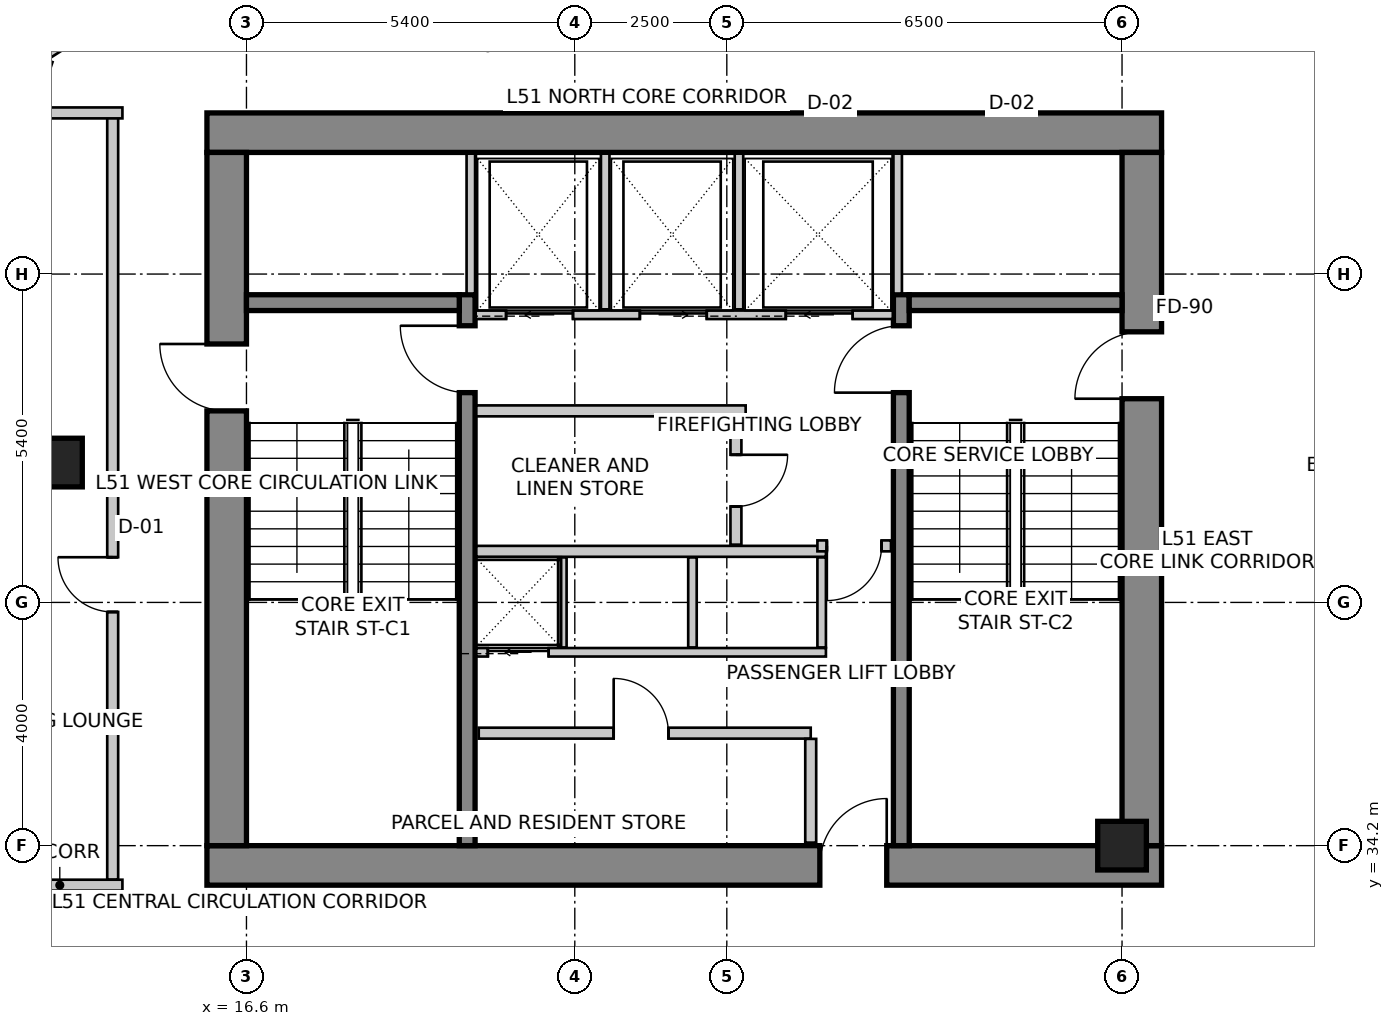
"""IFC4 building model, lengths in metres.
Left out: names, types, materials, properties, quantities, classifications, styles, units other than length and angle.
Written with IfcOpenShell. Run it as: python <this file> out.ifc"""

import sys

from ifc_helpers import new_model, si_unit, direction, frame, frame_2d, origin, origin_2d, place, context, subcontext, project, spatial, rectangle, extrude, source, transform, mapped, element, fill, save


model = new_model("IFC4")
c1 = context("Model", 3, precision=1e-05, world=origin(), true_north=direction((0.0, 1.0)))
c2 = subcontext(c1, "Body", "Model", "MODEL_VIEW")
j1 = project(units=[si_unit("LENGTHUNIT", "METRE"), si_unit("PLANEANGLEUNIT", "RADIAN")], contexts=[c1])
p1 = place(None, origin())
s1 = spatial("IfcSite", under=j1, at=p1, CompositionType="ELEMENT")
p2 = place(p1, origin())
s2 = spatial("IfcBuilding", under=s1, at=p2, CompositionType="ELEMENT")
p3 = place(p2, frame((0.0, 0.0, 204.4)))
s3 = spatial("IfcBuildingStorey", under=s2, at=p3, CompositionType="ELEMENT", Elevation=204.4)
p4 = place(p3, frame((15.95, 45.925, 0.0), z_axis=(0.0, 0.0, 1.0), x_axis=(1.0, 0.0, 0.0)))
e1 = element("IfcWall", 1, at=p4, inside=s3, PredefinedType="SHEAR", context=c2, shape_type="SweptSolid", body=[
    extrude(rectangle(XDim=15.7, YDim=0.65, at=frame_2d((7.85, 0.0))), origin(), (0.0, 0.0, 1.0), 3.5),
])
p5 = place(p3, frame((15.95, 33.875, 0.0), z_axis=(0.0, 0.0, 1.0), x_axis=(1.0, 0.0, 0.0)))
e2 = element("IfcWall", 2, at=p5, inside=s3, PredefinedType="SHEAR", context=c2, shape_type="SweptSolid", body=[
    extrude(rectangle(XDim=15.7, YDim=0.65, at=frame_2d((7.85, 0.0))), origin(), (0.0, 0.0, 1.0), 3.5),
])
m1 = source(origin(), c2, "Body", "SweptSolid", [
    extrude(rectangle(XDim=1.1, YDim=2.15, at=frame_2d((0.55, 1.075))), frame((0.0, 0.335, 0.0), z_axis=(0.0, -1.0, 0.0), x_axis=(1.0, 0.0, 0.0)), (0.0, 0.0, 1.0), 0.67),
])
p6 = place(p5, frame((10.08, 0.0, 0.0)))
e3 = element("IfcOpeningElement", 3, at=p6, cuts=e2, PredefinedType="OPENING", context=c2, shape_type="MappedRepresentation", body=[
    mapped(m1, transform((0.0, 0.0, 0.0), scale=1.0)),
])
p7 = place(p3, frame((16.275, 34.2, 0.0), z_axis=(0.0, 0.0, 1.0), x_axis=(0.0, 1.0, 0.0)))
e4 = element("IfcWall", 4, at=p7, inside=s3, PredefinedType="SHEAR", context=c2, shape_type="SweptSolid", body=[
    extrude(rectangle(XDim=11.4, YDim=0.65, at=frame_2d((5.7, 0.0))), origin(), (0.0, 0.0, 1.0), 3.5),
])
p8 = place(p7, frame((7.15, 0.0, 0.0)))
e5 = element("IfcOpeningElement", 5, at=p8, cuts=e4, PredefinedType="OPENING", context=c2, shape_type="MappedRepresentation", body=[
    mapped(m1, transform((0.0, 0.0, 0.0), scale=1.0)),
])
p9 = place(p3, frame((31.325, 34.2, 0.0), z_axis=(0.0, 0.0, 1.0), x_axis=(0.0, 1.0, 0.0)))
e6 = element("IfcWall", 6, at=p9, inside=s3, PredefinedType="SHEAR", context=c2, shape_type="SweptSolid", body=[
    extrude(rectangle(XDim=11.4, YDim=0.65, at=frame_2d((5.7, 0.0))), origin(), (0.0, 0.0, 1.0), 3.5),
])
p10 = place(p9, frame((7.35, 0.0, 0.0)))
e7 = element("IfcOpeningElement", 7, at=p10, cuts=e6, PredefinedType="OPENING", context=c2, shape_type="MappedRepresentation", body=[
    mapped(m1, transform((0.0, 0.0, 0.0), scale=1.0)),
])
p11 = place(p3, frame((20.23, 34.2, 0.0), z_axis=(0.0, 0.0, 1.0), x_axis=(0.0, 1.0, 0.0)))
e8 = element("IfcWall", 8, at=p11, inside=s3, PredefinedType="SHEAR", context=c2, shape_type="SweptSolid", body=[
    extrude(rectangle(XDim=9.06, YDim=0.26, at=frame_2d((4.53, 0.0))), origin(), (0.0, 0.0, 1.0), 3.5),
])
m2 = source(origin(), c2, "Body", "SweptSolid", [
    extrude(rectangle(XDim=1.1, YDim=2.15, at=frame_2d((0.55, 1.075))), frame((0.0, 0.14, 0.0), z_axis=(0.0, -1.0, 0.0), x_axis=(1.0, 0.0, 0.0)), (0.0, 0.0, 1.0), 0.28),
])
p12 = place(p11, frame((7.45, 0.0, 0.0)))
e9 = element("IfcOpeningElement", 9, at=p12, cuts=e8, PredefinedType="OPENING", context=c2, shape_type="MappedRepresentation", body=[
    mapped(m2, transform((0.0, 0.0, 0.0), scale=1.0)),
])
p13 = place(p3, frame((27.37, 34.2, 0.0), z_axis=(0.0, 0.0, 1.0), x_axis=(0.0, 1.0, 0.0)))
e10 = element("IfcWall", 10, at=p13, inside=s3, PredefinedType="SHEAR", context=c2, shape_type="SweptSolid", body=[
    extrude(rectangle(XDim=9.06, YDim=0.26, at=frame_2d((4.53, 0.0))), origin(), (0.0, 0.0, 1.0), 3.5),
])
p14 = place(p13, frame((7.45, 0.0, 0.0)))
e11 = element("IfcOpeningElement", 11, at=p14, cuts=e10, PredefinedType="OPENING", context=c2, shape_type="MappedRepresentation", body=[
    mapped(m2, transform((0.0, 0.0, 0.0), scale=1.0)),
])
for number, where, z_axis, x_axis in (
    (12, (16.6, 43.13, 0.0), (0.0, 0.0, 1.0), (1.0, 0.0, 0.0)),
    (13, (27.5, 43.13, 0.0), (0.0, 0.0, 1.0), (1.0, 0.0, 0.0)),
):
    element("IfcWall", number, at=place(p3, frame(where, z_axis=z_axis, x_axis=x_axis)), inside=s3, PredefinedType="SHEAR", context=c2, shape_type="SweptSolid", body=[
        extrude(rectangle(XDim=3.5, YDim=0.26, at=frame_2d((1.75, 0.0))), origin(), (0.0, 0.0, 1.0), 3.5),
    ])
m3 = source(origin(), c2, "Body", "SweptSolid", [
    extrude(rectangle(XDim=0.8, YDim=0.8, at=origin_2d()), origin(), (0.0, 0.0, 1.0), 3.5),
])
for number, where, z_axis, x_axis in (
    (14, (13.5, 40.5, 0.0), (0.0, 0.0, 1.0), (1.0, 0.0, 0.0)),
    (15, (31.0, 34.2, 0.0), (0.0, 0.0, 1.0), (1.0, 0.0, 0.0)),
):
    element("IfcColumn", number, at=place(p3, frame(where, z_axis=z_axis, x_axis=x_axis)), inside=s3, PredefinedType="COLUMN", context=c2, shape_type="MappedRepresentation", body=[
        mapped(m3, transform((0.0, 0.0, 0.0), scale=1.0)),
    ])
p15 = place(p3, frame((21.875, 52.742, 0.0), z_axis=(0.0, 0.0, 1.0), x_axis=(-0.843666375448, -0.536867811419, 0.0)))
e16 = element("IfcWall", 16, at=p15, inside=s3, PredefinedType="SOLIDWALL", context=c2, shape_type="SweptSolid", body=[
    extrude(rectangle(XDim=10.284, YDim=0.3, at=frame_2d((5.142, 0.0))), origin(), (0.0, 0.0, 1.0), 3.25),
])
m4 = source(origin(), c2, "Body", "SweptSolid", [
    extrude(rectangle(XDim=2.4, YDim=2.2, at=frame_2d((1.2, 1.1))), frame((0.0, 0.16, 0.0), z_axis=(0.0, -1.0, 0.0), x_axis=(1.0, 0.0, 0.0)), (0.0, 0.0, 1.0), 0.32),
])
p16 = place(p15, frame((3.307, 0.0, 0.85)))
e17 = element("IfcOpeningElement", 17, at=p16, cuts=e16, PredefinedType="OPENING", context=c2, shape_type="MappedRepresentation", body=[
    mapped(m4, transform((0.0, 0.0, 0.0), scale=1.0)),
])
p17 = place(p3, frame((13.269, 47.134, 0.0), z_axis=(0.0, 0.0, 1.0), x_axis=(-0.319920776449, -0.947444297464, 0.0)))
e18 = element("IfcWall", 18, at=p17, inside=s3, PredefinedType="SOLIDWALL", context=c2, shape_type="SweptSolid", body=[
    extrude(rectangle(XDim=16.133, YDim=0.3, at=frame_2d((8.067, 0.0))), origin(), (0.0, 0.0, 1.0), 3.25),
])
m5 = source(origin(), c2, "Body", "SweptSolid", [
    extrude(rectangle(XDim=2.1, YDim=2.0, at=frame_2d((1.05, 1.0))), frame((0.0, 0.16, 0.0), z_axis=(0.0, -1.0, 0.0), x_axis=(1.0, 0.0, 0.0)), (0.0, 0.0, 1.0), 0.32),
])
p18 = place(p17, frame((2.513, 0.0, 0.85)))
e19 = element("IfcOpeningElement", 19, at=p18, cuts=e18, PredefinedType="OPENING", context=c2, shape_type="MappedRepresentation", body=[
    mapped(m5, transform((0.0, 0.0, 0.0), scale=1.0)),
])
p19 = place(p17, frame((7.26, 0.0, 0.85)))
e20 = element("IfcOpeningElement", 20, at=p19, cuts=e18, PredefinedType="OPENING", context=c2, shape_type="MappedRepresentation", body=[
    mapped(m4, transform((0.0, 0.0, 0.0), scale=1.0)),
])
p20 = place(p17, frame((12.307, 0.0, 0.85)))
e21 = element("IfcOpeningElement", 21, at=p20, cuts=e18, PredefinedType="OPENING", context=c2, shape_type="MappedRepresentation", body=[
    mapped(m5, transform((0.0, 0.0, 0.0), scale=1.0)),
])
p21 = place(p3, frame((20.37, 42.93, 0.0), z_axis=(0.0, 0.0, 1.0), x_axis=(1.0, 0.0, 0.0)))
e22 = element("IfcWall", 22, at=p21, inside=s3, PredefinedType="SOLIDWALL", context=c2, shape_type="SweptSolid", body=[
    extrude(rectangle(XDim=6.86, YDim=0.14, at=frame_2d((3.43, 0.0))), origin(), (0.0, 0.0, 1.0), 3.25),
])
m6 = source(origin(), c2, "Body", "SweptSolid", [
    extrude(rectangle(XDim=1.1, YDim=2.15, at=frame_2d((0.55, 1.075))), frame((0.0, 0.08, 0.0), z_axis=(0.0, -1.0, 0.0), x_axis=(1.0, 0.0, 0.0)), (0.0, 0.0, 1.0), 0.16),
])
p22 = place(p21, frame((0.5, 0.0, 0.0)))
e23 = element("IfcOpeningElement", 23, at=p22, cuts=e22, PredefinedType="OPENING", context=c2, shape_type="MappedRepresentation", body=[
    mapped(m6, transform((0.0, 0.0, 0.0), scale=1.0)),
])
p23 = place(p21, frame((2.7, 0.0, 0.0)))
e24 = element("IfcOpeningElement", 24, at=p23, cuts=e22, PredefinedType="OPENING", context=c2, shape_type="MappedRepresentation", body=[
    mapped(m6, transform((0.0, 0.0, 0.0), scale=1.0)),
])
p24 = place(p21, frame((5.1, 0.0, 0.0)))
e25 = element("IfcOpeningElement", 25, at=p24, cuts=e22, PredefinedType="OPENING", context=c2, shape_type="MappedRepresentation", body=[
    mapped(m6, transform((0.0, 0.0, 0.0), scale=1.0)),
])
for number, where, z_axis, x_axis in (
    (26, (20.29, 43.28, 0.0), (0.0, 0.0, 1.0), (0.0, 1.0, 0.0)),
    (27, (27.31, 43.28, 0.0), (0.0, 0.0, 1.0), (0.0, 1.0, 0.0)),
):
    element("IfcWall", number, at=place(p3, frame(where, z_axis=z_axis, x_axis=x_axis)), inside=s3, PredefinedType="SOLIDWALL", context=c2, shape_type="SweptSolid", body=[
        extrude(rectangle(XDim=2.3, YDim=0.14, at=frame_2d((1.15, 0.0))), origin(), (0.0, 0.0, 1.0), 3.25),
    ])
for number, where, z_axis, x_axis in (
    (28, (22.5, 43.02, 0.0), (0.0, 0.0, 1.0), (0.0, 1.0, 0.0)),
    (29, (24.7, 43.02, 0.0), (0.0, 0.0, 1.0), (0.0, 1.0, 0.0)),
):
    element("IfcWall", number, at=place(p3, frame(where, z_axis=z_axis, x_axis=x_axis)), inside=s3, PredefinedType="SOLIDWALL", context=c2, shape_type="SweptSolid", body=[
        extrude(rectangle(XDim=2.56, YDim=0.14, at=frame_2d((1.28, 0.0))), origin(), (0.0, 0.0, 1.0), 3.25),
    ])
p25 = place(p3, frame((20.38, 37.38, 0.0), z_axis=(0.0, 0.0, 1.0), x_axis=(1.0, 0.0, 0.0)))
e30 = element("IfcWall", 30, at=p25, inside=s3, PredefinedType="SOLIDWALL", context=c2, shape_type="SweptSolid", body=[
    extrude(rectangle(XDim=5.75, YDim=0.14, at=frame_2d((2.875, 0.0))), origin(), (0.0, 0.0, 1.0), 3.25),
])
m7 = source(origin(), c2, "Body", "SweptSolid", [
    extrude(rectangle(XDim=1.0, YDim=2.15, at=frame_2d((0.5, 1.075))), frame((0.0, 0.08, 0.0), z_axis=(0.0, -1.0, 0.0), x_axis=(1.0, 0.0, 0.0)), (0.0, 0.0, 1.0), 0.16),
])
p26 = place(p25, frame((0.19, 0.0, 0.0)))
e31 = element("IfcOpeningElement", 31, at=p26, cuts=e30, PredefinedType="OPENING", context=c2, shape_type="MappedRepresentation", body=[
    mapped(m7, transform((0.0, 0.0, 0.0), scale=1.0)),
])
p27 = place(p3, frame((20.38, 39.04, 0.0), z_axis=(0.0, 0.0, 1.0), x_axis=(1.0, 0.0, 0.0)))
e32 = element("IfcWall", 32, at=p27, inside=s3, PredefinedType="SOLIDWALL", context=c2, shape_type="SweptSolid", body=[
    extrude(rectangle(XDim=5.75, YDim=0.18, at=frame_2d((2.875, 0.0))), origin(), (0.0, 0.0, 1.0), 3.25),
])
for number, where, z_axis, x_axis in (
    (33, (26.06, 37.46, 0.0), (0.0, 0.0, 1.0), (0.0, 1.0, 0.0)),
    (34, (21.795, 37.46, 0.0), (0.0, 0.0, 1.0), (0.0, 1.0, 0.0)),
    (35, (23.935, 37.46, 0.0), (0.0, 0.0, 1.0), (0.0, 1.0, 0.0)),
):
    element("IfcWall", number, at=place(p3, frame(where, z_axis=z_axis, x_axis=x_axis)), inside=s3, PredefinedType="SOLIDWALL", context=c2, shape_type="SweptSolid", body=[
        extrude(rectangle(XDim=1.48, YDim=0.14, at=frame_2d((0.74, 0.0))), origin(), (0.0, 0.0, 1.0), 3.25),
    ])
p28 = place(p3, frame((24.81, 41.35, 0.0), z_axis=(0.0, 0.0, 1.0), x_axis=(-1.0, 0.0, 0.0)))
e36 = element("IfcWall", 36, at=p28, inside=s3, PredefinedType="PARTITIONING", context=c2, shape_type="SweptSolid", body=[
    extrude(rectangle(XDim=4.43, YDim=0.18, at=frame_2d((2.215, 0.0))), origin(), (0.0, 0.0, 1.0), 3.25),
])
p29 = place(p3, frame((24.65, 41.256, 0.0), z_axis=(0.0, 0.0, 1.0), x_axis=(0.0, -1.0, 0.0)))
e37 = element("IfcWall", 37, at=p29, inside=s3, PredefinedType="PARTITIONING", context=c2, shape_type="SweptSolid", body=[
    extrude(rectangle(XDim=2.106, YDim=0.18, at=frame_2d((1.053, 0.0))), origin(), (0.0, 0.0, 1.0), 3.25),
])
m8 = source(origin(), c2, "Body", "SweptSolid", [
    extrude(rectangle(XDim=0.85, YDim=2.15, at=frame_2d((0.425, 1.075))), frame((0.0, 0.1, 0.0), z_axis=(0.0, -1.0, 0.0), x_axis=(1.0, 0.0, 0.0)), (0.0, 0.0, 1.0), 0.2),
])
p30 = place(p29, frame((0.628, 0.0, 0.0)))
e38 = element("IfcOpeningElement", 38, at=p30, cuts=e37, PredefinedType="OPENING", context=c2, shape_type="MappedRepresentation", body=[
    mapped(m8, transform((0.0, 0.0, 0.0), scale=1.0)),
])
p31 = place(p3, frame((27.2, 39.13, 0.0), z_axis=(0.0, 0.0, 1.0), x_axis=(-1.0, 0.0, 0.0)))
e39 = element("IfcWall", 39, at=p31, inside=s3, PredefinedType="PARTITIONING", context=c2, shape_type="SweptSolid", body=[
    extrude(rectangle(XDim=1.21, YDim=0.18, at=frame_2d((0.605, 0.0))), origin(), (0.0, 0.0, 1.0), 3.25),
])
m9 = source(origin(), c2, "Body", "SweptSolid", [
    extrude(rectangle(XDim=0.9, YDim=2.15, at=frame_2d((0.45, 1.075))), frame((0.0, 0.1, 0.0), z_axis=(0.0, -1.0, 0.0), x_axis=(1.0, 0.0, 0.0)), (0.0, 0.0, 1.0), 0.2),
])
p32 = place(p31, frame((0.155, 0.0, 0.0)))
e40 = element("IfcOpeningElement", 40, at=p32, cuts=e39, PredefinedType="OPENING", context=c2, shape_type="MappedRepresentation", body=[
    mapped(m9, transform((0.0, 0.0, 0.0), scale=1.0)),
])
p33 = place(p3, frame((20.42, 36.05, 0.0), z_axis=(0.0, 0.0, 1.0), x_axis=(1.0, 0.0, 0.0)))
e41 = element("IfcWall", 41, at=p33, inside=s3, PredefinedType="PARTITIONING", context=c2, shape_type="SweptSolid", body=[
    extrude(rectangle(XDim=5.46, YDim=0.18, at=frame_2d((2.73, 0.0))), origin(), (0.0, 0.0, 1.0), 3.25),
])
p34 = place(p33, frame((2.219, 0.0, 0.0)))
e42 = element("IfcOpeningElement", 42, at=p34, cuts=e41, PredefinedType="OPENING", context=c2, shape_type="MappedRepresentation", body=[
    mapped(m9, transform((0.0, 0.0, 0.0), scale=1.0)),
])
p35 = place(p3, frame((25.88, 35.956, 0.0), z_axis=(0.0, 0.0, 1.0), x_axis=(0.0, -1.0, 0.0)))
e43 = element("IfcWall", 43, at=p35, inside=s3, PredefinedType="PARTITIONING", context=c2, shape_type="SweptSolid", body=[
    extrude(rectangle(XDim=1.706, YDim=0.18, at=frame_2d((0.853, 0.0))), origin(), (0.0, 0.0, 1.0), 2.542),
])
p36 = place(p3, frame((12.5, 33.55, 0.0), z_axis=(0.0, 0.0, 1.0), x_axis=(1.0, 0.0, 0.0)))
e44 = element("IfcWall", 44, at=p36, inside=s3, PredefinedType="PARTITIONING", context=c2, shape_type="SweptSolid", body=[
    extrude(rectangle(XDim=2.06, YDim=0.18, at=frame_2d((1.03, 0.0))), origin(), (0.0, 0.0, 1.0), 3.25),
])
p37 = place(p3, frame((14.4, 33.644, 0.0), z_axis=(0.0, 0.0, 1.0), x_axis=(0.0, 1.0, 0.0)))
e45 = element("IfcWall", 45, at=p37, inside=s3, PredefinedType="PARTITIONING", context=c2, shape_type="SweptSolid", body=[
    extrude(rectangle(XDim=12.606, YDim=0.18, at=frame_2d((6.303, 0.0))), origin(), (0.0, 0.0, 1.0), 3.25),
])
p38 = place(p37, frame((4.399, 0.0, 0.0)))
e46 = element("IfcOpeningElement", 46, at=p38, cuts=e45, PredefinedType="OPENING", context=c2, shape_type="MappedRepresentation", body=[
    mapped(m9, transform((0.0, 0.0, 0.0), scale=1.0)),
])
p39 = place(p3, frame((14.56, 46.25, 0.0), z_axis=(0.0, 0.0, 1.0), x_axis=(-1.0, 0.0, 0.0)))
e47 = element("IfcWall", 47, at=p39, inside=s3, PredefinedType="PARTITIONING", context=c2, shape_type="SweptSolid", body=[
    extrude(rectangle(XDim=1.469, YDim=0.18, at=frame_2d((0.734, 0.0))), origin(), (0.0, 0.0, 1.0), 3.25),
])
m10 = source(origin(), c2, "Body", "SweptSolid", [
    extrude(rectangle(XDim=1.1, YDim=2.15, at=frame_2d((0.55, 1.075))), frame((0.0, 0.025, 0.0), z_axis=(0.0, -1.0, 0.0), x_axis=(1.0, 0.0, 0.0)), (0.0, 0.0, 1.0), 0.05),
])
p40 = place(p22, origin())
e48 = element("IfcDoor", 48, at=p40, inside=s3, OperationType="SLIDING_TO_LEFT", PredefinedType="DOOR", context=c2, shape_type="MappedRepresentation", body=[
    mapped(m10, transform((0.0, 0.0, 0.0), scale=1.0)),
])
fill(e23, e48)
p41 = place(p23, origin())
e49 = element("IfcDoor", 49, at=p41, inside=s3, OperationType="SLIDING_TO_RIGHT", PredefinedType="DOOR", context=c2, shape_type="MappedRepresentation", body=[
    mapped(m10, transform((0.0, 0.0, 0.0), scale=1.0)),
])
fill(e24, e49)
m11 = source(origin(), c2, "Body", "SweptSolid", [
    extrude(rectangle(XDim=1.1, YDim=2.15, at=frame_2d((0.55, 1.075))), frame((0.0, 0.025, 0.0), z_axis=(0.0, -1.0, 0.0), x_axis=(1.0, 0.0, 0.0)), (0.0, 0.0, 1.0), 0.05),
])
p42 = place(p24, origin())
e50 = element("IfcDoor", 50, at=p42, inside=s3, OperationType="SLIDING_TO_LEFT", PredefinedType="DOOR", context=c2, shape_type="MappedRepresentation", body=[
    mapped(m11, transform((0.0, 0.0, 0.0), scale=1.0)),
])
fill(e25, e50)
m12 = source(origin(), c2, "Body", "SweptSolid", [
    extrude(rectangle(XDim=1.0, YDim=2.15, at=frame_2d((0.5, 1.075))), frame((0.0, 0.025, 0.0), z_axis=(0.0, -1.0, 0.0), x_axis=(1.0, 0.0, 0.0)), (0.0, 0.0, 1.0), 0.05),
])
p43 = place(p26, origin())
e51 = element("IfcDoor", 51, at=p43, inside=s3, OperationType="SLIDING_TO_LEFT", PredefinedType="DOOR", context=c2, shape_type="MappedRepresentation", body=[
    mapped(m12, transform((0.0, 0.0, 0.0), scale=1.0)),
])
fill(e31, e51)
m13 = source(origin(), c2, "Body", "SweptSolid", [
    extrude(rectangle(XDim=1.1, YDim=2.15, at=frame_2d((0.55, 1.075))), frame((0.0, 0.025, 0.0), z_axis=(0.0, -1.0, 0.0), x_axis=(1.0, 0.0, 0.0)), (0.0, 0.0, 1.0), 0.05),
])
p44 = place(p12, origin())
e52 = element("IfcDoor", 52, at=p44, inside=s3, OperationType="SINGLE_SWING_RIGHT", PredefinedType="DOOR", context=c2, shape_type="MappedRepresentation", body=[
    mapped(m13, transform((0.0, 0.0, 0.0), scale=1.0)),
])
fill(e9, e52)
p45 = place(p14, origin())
e53 = element("IfcDoor", 53, at=p45, inside=s3, OperationType="SINGLE_SWING_LEFT", PredefinedType="DOOR", context=c2, shape_type="MappedRepresentation", body=[
    mapped(m13, transform((0.0, 0.0, 0.0), scale=1.0)),
])
fill(e11, e53)
p46 = place(p8, origin())
e54 = element("IfcDoor", 54, at=p46, inside=s3, OperationType="SINGLE_SWING_RIGHT", PredefinedType="DOOR", context=c2, shape_type="MappedRepresentation", body=[
    mapped(m13, transform((0.0, 0.0, 0.0), scale=1.0)),
])
fill(e5, e54)
p47 = place(p10, origin())
e55 = element("IfcDoor", 55, at=p47, inside=s3, OperationType="SINGLE_SWING_LEFT", PredefinedType="DOOR", context=c2, shape_type="MappedRepresentation", body=[
    mapped(m13, transform((0.0, 0.0, 0.0), scale=1.0)),
])
fill(e7, e55)
p48 = place(p6, origin())
e56 = element("IfcDoor", 56, at=p48, inside=s3, OperationType="SINGLE_SWING_RIGHT", PredefinedType="DOOR", context=c2, shape_type="MappedRepresentation", body=[
    mapped(m13, transform((0.0, 0.0, 0.0), scale=1.0)),
])
fill(e3, e56)
m14 = source(origin(), c2, "Body", "SweptSolid", [
    extrude(rectangle(XDim=0.85, YDim=2.15, at=frame_2d((0.425, 1.075))), frame((0.0, 0.025, 0.0), z_axis=(0.0, -1.0, 0.0), x_axis=(1.0, 0.0, 0.0)), (0.0, 0.0, 1.0), 0.05),
])
p49 = place(p30, origin())
e57 = element("IfcDoor", 57, at=p49, inside=s3, OperationType="SINGLE_SWING_LEFT", PredefinedType="DOOR", context=c2, shape_type="MappedRepresentation", body=[
    mapped(m14, transform((0.0, 0.0, 0.0), scale=1.0)),
])
fill(e38, e57)
m15 = source(origin(), c2, "Body", "SweptSolid", [
    extrude(rectangle(XDim=0.9, YDim=2.15, at=frame_2d((0.45, 1.075))), frame((0.0, 0.025, 0.0), z_axis=(0.0, -1.0, 0.0), x_axis=(1.0, 0.0, 0.0)), (0.0, 0.0, 1.0), 0.05),
])
p50 = place(p32, origin())
e58 = element("IfcDoor", 58, at=p50, inside=s3, OperationType="SINGLE_SWING_RIGHT", PredefinedType="DOOR", context=c2, shape_type="MappedRepresentation", body=[
    mapped(m15, transform((0.0, 0.0, 0.0), scale=1.0)),
])
fill(e40, e58)
p51 = place(p34, origin())
e59 = element("IfcDoor", 59, at=p51, inside=s3, OperationType="SINGLE_SWING_LEFT", PredefinedType="DOOR", context=c2, shape_type="MappedRepresentation", body=[
    mapped(m15, transform((0.0, 0.0, 0.0), scale=1.0)),
])
fill(e42, e59)
m16 = source(origin(), c2, "Body", "SweptSolid", [
    extrude(rectangle(XDim=0.9, YDim=2.15, at=frame_2d((0.45, 1.075))), frame((0.0, 0.025, 0.0), z_axis=(0.0, -1.0, 0.0), x_axis=(1.0, 0.0, 0.0)), (0.0, 0.0, 1.0), 0.05),
])
p52 = place(p38, origin())
e60 = element("IfcDoor", 60, at=p52, inside=s3, OperationType="SINGLE_SWING_RIGHT", PredefinedType="DOOR", context=c2, shape_type="MappedRepresentation", body=[
    mapped(m16, transform((0.0, 0.0, 0.0), scale=1.0)),
])
fill(e46, e60)
save(model, sys.argv[1])
